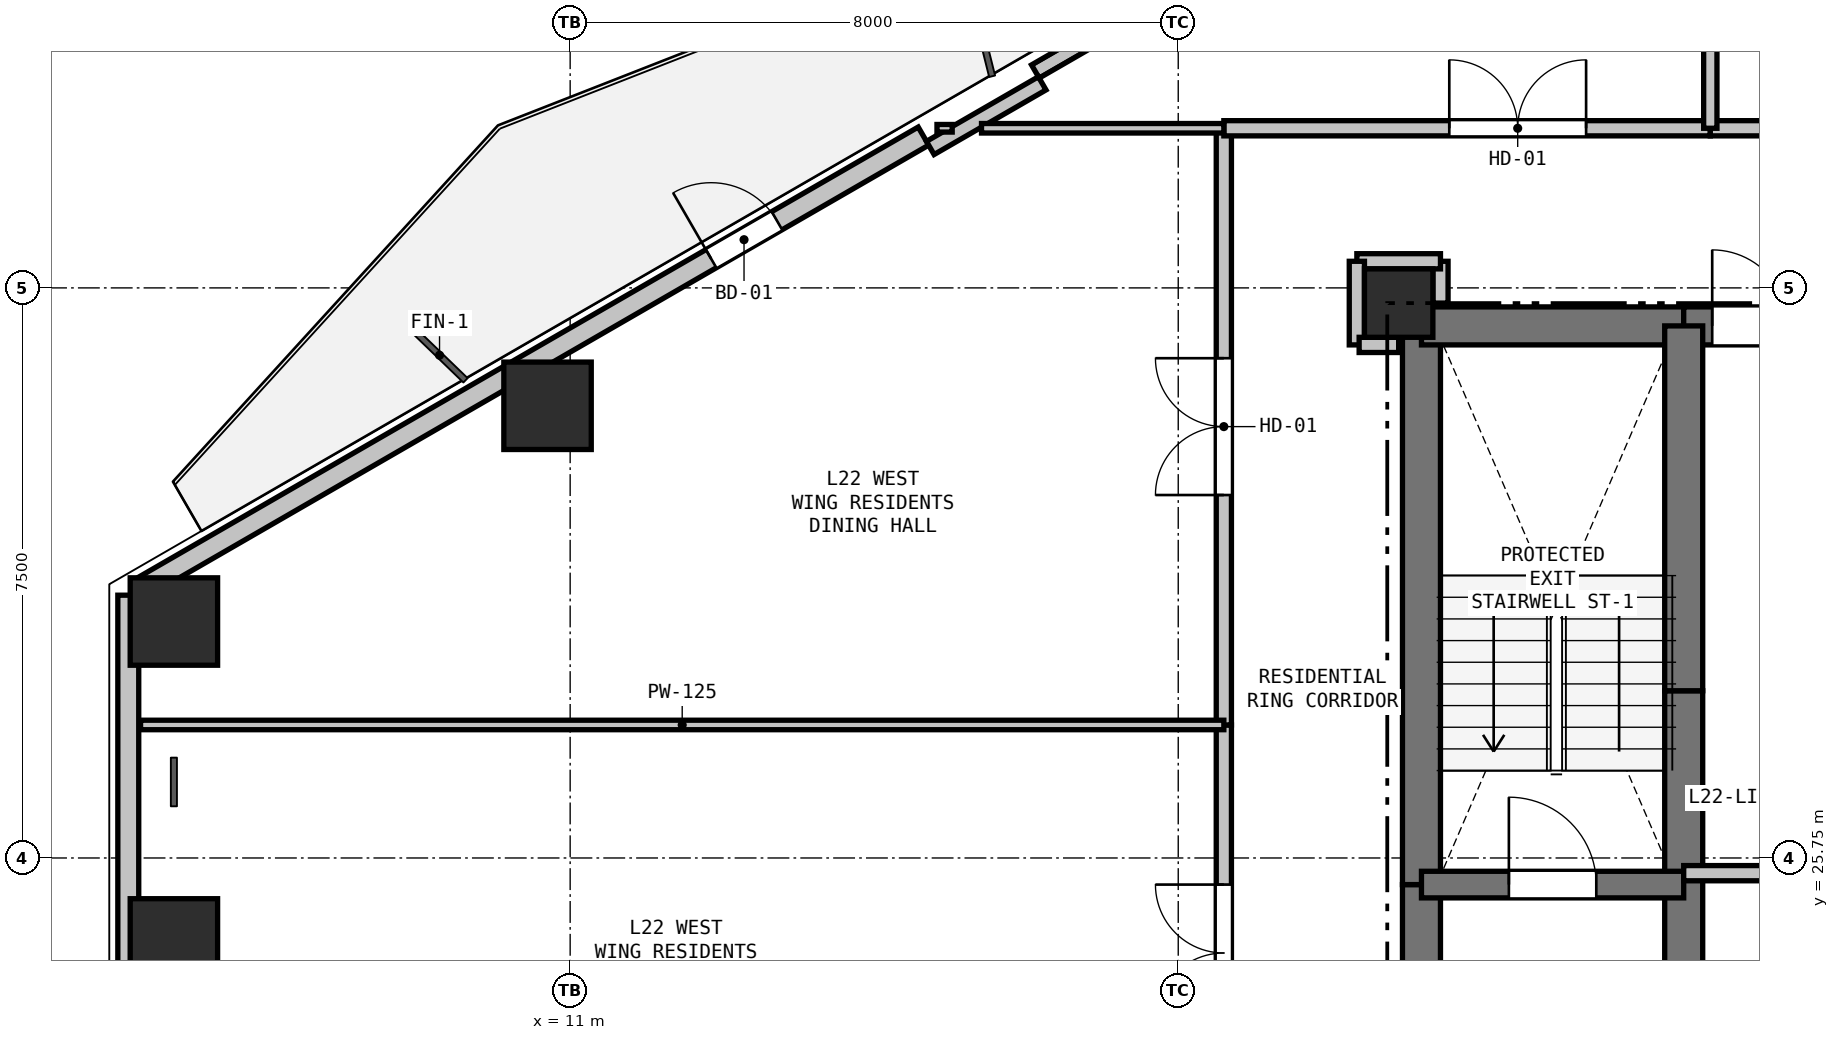
"""IFC4 building model, lengths in metres.
Left out: names, types, materials, properties, quantities, classifications, styles, units other than length and angle.
Written with IfcOpenShell. Run it as: python <this file> out.ifc"""

import sys

from ifc_helpers import new_model, si_unit, direction, frame, frame_2d, origin, origin_2d, place, context, subcontext, project, spatial, rectangle, hollow_rectangle, extrude, element, fill, save


model = new_model("IFC4")
c1 = context("Model", 3, precision=1e-05, world=origin(), true_north=direction((0.0, 1.0)))
c2 = subcontext(c1, "Body", "Model", "MODEL_VIEW")
j1 = project(units=[si_unit("LENGTHUNIT", "METRE"), si_unit("PLANEANGLEUNIT", "RADIAN")], contexts=[c1])
p1 = place(None, origin())
s1 = spatial("IfcSite", under=j1, at=p1, CompositionType="ELEMENT")
p2 = place(p1, origin())
s2 = spatial("IfcBuilding", under=s1, at=p2, CompositionType="ELEMENT")
p3 = place(p2, frame((0.0, 0.0, 83.4)))
s3 = spatial("IfcBuildingStorey", under=s2, at=p3, CompositionType="ELEMENT", Elevation=83.4)
p4 = place(p3, frame((21.9, 33.05, 0.0), z_axis=(0.0, 0.0, 1.0), x_axis=(1.0, 0.0, 0.0)))
e1 = element("IfcColumn", 1, at=p4, inside=s3, PredefinedType="COLUMN", context=c2, shape_type="SweptSolid", body=[
    extrude(rectangle(XDim=0.9, YDim=0.9, at=origin_2d()), origin(), (0.0, 0.0, 1.0), 3.3),
])
for number, where, z_axis, x_axis in (
    (2, (5.787, 28.861, 0.0), (0.0, 0.0, 1.0), (1.0, 0.0, 0.0)),
    (3, (10.702, 31.699, 0.0), (0.0, 0.0, 1.0), (1.0, 0.0, 0.0)),
    (4, (5.787, 24.639, 0.0), (0.0, 0.0, 1.0), (1.0, 0.0, 0.0)),
):
    element("IfcColumn", number, at=place(p3, frame(where, z_axis=z_axis, x_axis=x_axis)), inside=s3, PredefinedType="COLUMN", context=c2, shape_type="SweptSolid", body=[
        extrude(hollow_rectangle(XDim=1.15, YDim=1.15, WallThickness=0.032, at=origin_2d()), origin(), (0.0, 0.0, 1.0), 3.3),
    ])
p5 = place(p3, frame((5.187, 24.293, 0.0), z_axis=(0.0, 0.0, 1.0), x_axis=(0.0, 1.0, 0.0)))
e5 = element("IfcWall", 5, at=p5, inside=s3, PredefinedType="SOLIDWALL", context=c2, shape_type="SweptSolid", body=[
    extrude(rectangle(XDim=4.915, YDim=0.275, at=frame_2d((2.457, 0.0))), origin(), (0.0, 0.0, 1.0), 2.67),
])
p6 = place(p3, frame((5.317, 29.282, 0.0), z_axis=(0.0, 0.0, 1.0), x_axis=(0.866023023012, 0.500004123596, 0.0)))
e6 = element("IfcWall", 6, at=p6, inside=s3, PredefinedType="SOLIDWALL", context=c2, shape_type="SweptSolid", body=[
    extrude(rectangle(XDim=11.93, YDim=0.275, at=frame_2d((5.965, 0.0))), origin(), (0.0, 0.0, 1.0), 2.67),
])
p7 = place(p6, frame((8.704, 0.0, 0.0)))
e7 = element("IfcOpeningElement", 7, at=p7, cuts=e6, PredefinedType="OPENING", context=c2, shape_type="SweptSolid", body=[
    extrude(rectangle(XDim=1.0, YDim=2.1, at=frame_2d((0.5, 1.05))), frame((0.0, 0.147, 0.0), z_axis=(0.0, -1.0, 0.0), x_axis=(1.0, 0.0, 0.0)), (0.0, 0.0, 1.0), 0.295),
])
p8 = place(p3, frame((17.12, 36.097, 0.0), z_axis=(0.0, 0.0, 1.0), x_axis=(0.866027010039, 0.499997217876, 0.0)))
e8 = element("IfcWall", 8, at=p8, inside=s3, PredefinedType="PARAPET", context=c2, shape_type="SweptSolid", body=[
    extrude(rectangle(XDim=11.229, YDim=0.2, at=frame_2d((5.615, 0.0))), origin(), (0.0, 0.0, 1.0), 0.2),
])
p9 = place(p3, frame((15.738, 35.091, 0.0), z_axis=(0.0, 0.0, 1.0), x_axis=(0.866025371046, 0.500000056704, 0.0)))
e9 = element("IfcWall", 9, at=p9, inside=s3, PredefinedType="PARAPET", context=c2, shape_type="SweptSolid", body=[
    extrude(rectangle(XDim=1.7, YDim=0.2, at=frame_2d((0.85, 0.0))), origin(), (0.0, 0.0, 1.0), 2.67),
])
p10 = place(p3, frame((22.2, 20.75, 0.0), z_axis=(0.0, 0.0, 1.0), x_axis=(0.0, 1.0, 0.0)))
e10 = element("IfcWall", 10, at=p10, inside=s3, PredefinedType="SHEAR", context=c2, shape_type="SweptSolid", body=[
    extrude(rectangle(XDim=4.65, YDim=0.5, at=frame_2d((2.325, 0.0))), origin(), (0.0, 0.0, 1.0), 3.05),
])
p11 = place(p3, frame((22.2, 25.4, 0.0), z_axis=(0.0, 0.0, 1.0), x_axis=(0.0, 1.0, 0.0)))
e11 = element("IfcWall", 11, at=p11, inside=s3, PredefinedType="SHEAR", context=c2, shape_type="SweptSolid", body=[
    extrude(rectangle(XDim=7.35, YDim=0.5, at=frame_2d((3.675, 0.0))), origin(), (0.0, 0.0, 1.0), 3.05),
])
p12 = place(p3, frame((22.2, 32.75, 0.0), z_axis=(0.0, 0.0, 1.0), x_axis=(1.0, 0.0, 0.0)))
e12 = element("IfcWall", 12, at=p12, inside=s3, PredefinedType="SHEAR", context=c2, shape_type="SweptSolid", body=[
    extrude(rectangle(XDim=3.45, YDim=0.5, at=frame_2d((1.725, 0.0))), origin(), (0.0, 0.0, 1.0), 3.05),
])
p13 = place(p3, frame((25.65, 32.75, 0.0), z_axis=(0.0, 0.0, 1.0), x_axis=(1.0, 0.0, 0.0)))
e13 = element("IfcWall", 13, at=p13, inside=s3, PredefinedType="SHEAR", context=c2, shape_type="SweptSolid", body=[
    extrude(rectangle(XDim=1.75, YDim=0.5, at=frame_2d((0.875, 0.0))), origin(), (0.0, 0.0, 1.0), 3.05),
])
p14 = place(p13, frame((0.375, 0.0, 0.0)))
e14 = element("IfcOpeningElement", 14, at=p14, cuts=e13, PredefinedType="OPENING", context=c2, shape_type="SweptSolid", body=[
    extrude(rectangle(XDim=1.0, YDim=2.15, at=frame_2d((0.5, 1.075))), frame((0.0, 0.26, 0.0), z_axis=(0.0, -1.0, 0.0), x_axis=(1.0, 0.0, 0.0)), (0.0, 0.0, 1.0), 0.52),
])
p15 = place(p3, frame((25.65, 22.75, 0.0), z_axis=(0.0, 0.0, 1.0), x_axis=(0.0, 1.0, 0.0)))
e15 = element("IfcWall", 15, at=p15, inside=s3, PredefinedType="SHEAR", context=c2, shape_type="SweptSolid", body=[
    extrude(rectangle(XDim=2.8, YDim=0.5, at=frame_2d((1.4, 0.0))), origin(), (0.0, 0.0, 1.0), 3.05),
])
p16 = place(p3, frame((25.65, 25.55, 0.0), z_axis=(0.0, 0.0, 1.0), x_axis=(0.0, 1.0, 0.0)))
e16 = element("IfcWall", 16, at=p16, inside=s3, PredefinedType="SHEAR", context=c2, shape_type="SweptSolid", body=[
    extrude(rectangle(XDim=2.4, YDim=0.5, at=frame_2d((1.2, 0.0))), origin(), (0.0, 0.0, 1.0), 3.05),
])
p17 = place(p3, frame((25.65, 27.95, 0.0), z_axis=(0.0, 0.0, 1.0), x_axis=(0.0, 1.0, 0.0)))
e17 = element("IfcWall", 17, at=p17, inside=s3, PredefinedType="SHEAR", context=c2, shape_type="SweptSolid", body=[
    extrude(rectangle(XDim=4.8, YDim=0.5, at=frame_2d((2.4, 0.0))), origin(), (0.0, 0.0, 1.0), 3.05),
])
p18 = place(p3, frame((22.2, 25.4, 0.0), z_axis=(0.0, 0.0, 1.0), x_axis=(1.0, 0.0, 0.0)))
e18 = element("IfcWall", 18, at=p18, inside=s3, PredefinedType="SHEAR", context=c2, shape_type="SweptSolid", body=[
    extrude(rectangle(XDim=3.45, YDim=0.35, at=frame_2d((1.725, 0.0))), origin(), (0.0, 0.0, 1.0), 3.05),
])
p19 = place(p18, frame((1.15, 0.0, 0.0)))
e19 = element("IfcOpeningElement", 19, at=p19, cuts=e18, PredefinedType="OPENING", context=c2, shape_type="SweptSolid", body=[
    extrude(rectangle(XDim=1.15, YDim=2.15, at=frame_2d((0.575, 1.075))), frame((0.0, 0.185, 0.0), z_axis=(0.0, -1.0, 0.0), x_axis=(1.0, 0.0, 0.0)), (0.0, 0.0, 1.0), 0.37),
])
p20 = place(p3, frame((25.65, 25.55, 0.0), z_axis=(0.0, 0.0, 1.0), x_axis=(1.0, 0.0, 0.0)))
e20 = element("IfcWall", 20, at=p20, inside=s3, PredefinedType="PARTITIONING", context=c2, shape_type="SweptSolid", body=[
    extrude(rectangle(XDim=4.95, YDim=0.2, at=frame_2d((2.475, 0.0))), origin(), (0.0, 0.0, 1.0), 3.05),
])
p21 = place(p3, frame((19.6, 21.5, 0.0), z_axis=(0.0, 0.0, 1.0), x_axis=(0.0, 1.0, 0.0)))
e21 = element("IfcWall", 21, at=p21, inside=s3, PredefinedType="PARTITIONING", context=c2, shape_type="SweptSolid", body=[
    extrude(rectangle(XDim=6.0, YDim=0.2, at=frame_2d((3.0, 0.0))), origin(), (0.0, 0.0, 1.0), 3.05),
])
p22 = place(p21, frame((2.1, 0.0, 0.0)))
e22 = element("IfcOpeningElement", 22, at=p22, cuts=e21, PredefinedType="OPENING", context=c2, shape_type="SweptSolid", body=[
    extrude(rectangle(XDim=1.8, YDim=2.2, at=frame_2d((0.9, 1.1))), frame((0.0, 0.11, 0.0), z_axis=(0.0, -1.0, 0.0), x_axis=(1.0, 0.0, 0.0)), (0.0, 0.0, 1.0), 0.22),
])
p23 = place(p3, frame((19.6, 27.5, 0.0), z_axis=(0.0, 0.0, 1.0), x_axis=(0.0, 1.0, 0.0)))
e23 = element("IfcWall", 23, at=p23, inside=s3, PredefinedType="PARTITIONING", context=c2, shape_type="SweptSolid", body=[
    extrude(rectangle(XDim=7.85, YDim=0.2, at=frame_2d((3.925, 0.0))), origin(), (0.0, 0.0, 1.0), 2.423),
])
p24 = place(p23, frame((3.025, 0.0, 0.0)))
e24 = element("IfcOpeningElement", 24, at=p24, cuts=e23, PredefinedType="OPENING", context=c2, shape_type="SweptSolid", body=[
    extrude(rectangle(XDim=1.8, YDim=2.2, at=frame_2d((0.9, 1.1))), frame((0.0, 0.11, 0.0), z_axis=(0.0, -1.0, 0.0), x_axis=(1.0, 0.0, 0.0)), (0.0, 0.0, 1.0), 0.22),
])
p25 = place(p3, frame((19.6, 35.35, 0.0), z_axis=(0.0, 0.0, 1.0), x_axis=(1.0, 0.0, 0.0)))
e25 = element("IfcWall", 25, at=p25, inside=s3, PredefinedType="PARTITIONING", context=c2, shape_type="SweptSolid", body=[
    extrude(rectangle(XDim=6.4, YDim=0.2, at=frame_2d((3.2, 0.0))), origin(), (0.0, 0.0, 1.0), 3.05),
])
p26 = place(p25, frame((2.966, 0.0, 0.0)))
e26 = element("IfcOpeningElement", 26, at=p26, cuts=e25, PredefinedType="OPENING", context=c2, shape_type="SweptSolid", body=[
    extrude(rectangle(XDim=1.8, YDim=2.2, at=frame_2d((0.9, 1.1))), frame((0.0, 0.11, 0.0), z_axis=(0.0, -1.0, 0.0), x_axis=(1.0, 0.0, 0.0)), (0.0, 0.0, 1.0), 0.22),
])
p27 = place(p3, frame((26.0, 35.35, 0.0), z_axis=(0.0, 0.0, 1.0), x_axis=(1.0, 0.0, 0.0)))
e27 = element("IfcWall", 27, at=p27, inside=s3, PredefinedType="PARTITIONING", context=c2, shape_type="SweptSolid", body=[
    extrude(rectangle(XDim=2.2, YDim=0.2, at=frame_2d((1.1, 0.0))), origin(), (0.0, 0.0, 1.0), 3.05),
])
p28 = place(p27, frame((0.675, 0.0, 0.0)))
e28 = element("IfcOpeningElement", 28, at=p28, cuts=e27, PredefinedType="OPENING", context=c2, shape_type="SweptSolid", body=[
    extrude(rectangle(XDim=0.85, YDim=2.1, at=frame_2d((0.425, 1.05))), frame((0.0, 0.11, 0.0), z_axis=(0.0, -1.0, 0.0), x_axis=(1.0, 0.0, 0.0)), (0.0, 0.0, 1.0), 0.22),
])
p29 = place(p3, frame((22.45, 33.05, 0.0), z_axis=(0.0, 0.0, 1.0), x_axis=(0.0, 1.0, 0.0)))
e29 = element("IfcWall", 29, at=p29, inside=s3, PredefinedType="PARTITIONING", context=c2, shape_type="SweptSolid", body=[
    extrude(rectangle(XDim=0.55, YDim=0.2, at=frame_2d((0.275, 0.0))), origin(), (0.0, 0.0, 1.0), 2.498),
])
p30 = place(p3, frame((22.45, 33.6, 0.0), z_axis=(0.0, 0.0, 1.0), x_axis=(-1.0, 0.0, 0.0)))
e30 = element("IfcWall", 30, at=p30, inside=s3, PredefinedType="PARTITIONING", context=c2, shape_type="SweptSolid", body=[
    extrude(rectangle(XDim=1.1, YDim=0.2, at=frame_2d((0.55, 0.0))), origin(), (0.0, 0.0, 1.0), 3.05),
])
p31 = place(p3, frame((21.35, 33.6, 0.0), z_axis=(0.0, 0.0, 1.0), x_axis=(0.0, -1.0, 0.0)))
e31 = element("IfcWall", 31, at=p31, inside=s3, PredefinedType="PARTITIONING", context=c2, shape_type="SweptSolid", body=[
    extrude(rectangle(XDim=1.1, YDim=0.2, at=frame_2d((0.55, 0.0))), origin(), (0.0, 0.0, 1.0), 2.423),
])
p32 = place(p3, frame((21.38, 32.5, 0.0), z_axis=(0.0, 0.0, 1.0), x_axis=(1.0, 0.0, 0.0)))
e32 = element("IfcWall", 32, at=p32, inside=s3, PredefinedType="PARTITIONING", context=c2, shape_type="SweptSolid", body=[
    extrude(rectangle(XDim=0.52, YDim=0.2, at=frame_2d((0.26, 0.0))), origin(), (0.0, 0.0, 1.0), 2.498),
])
p33 = place(p3, frame((26.0, 35.35, 0.0), z_axis=(0.0, 0.0, 1.0), x_axis=(0.0, 1.0, 0.0)))
e33 = element("IfcWall", 33, at=p33, inside=s3, PredefinedType="PLUMBINGWALL", context=c2, shape_type="SweptSolid", body=[
    extrude(rectangle(XDim=2.3, YDim=0.175, at=frame_2d((1.15, 0.0))), origin(), (0.0, 0.0, 1.0), 3.05),
])
p34 = place(p3, frame((19.6, 35.35, 0.0), z_axis=(0.0, 0.0, 1.0), x_axis=(-1.0, 0.0, 0.0)))
e34 = element("IfcWall", 34, at=p34, inside=s3, PredefinedType="PARTITIONING", context=c2, shape_type="SweptSolid", body=[
    extrude(rectangle(XDim=3.188, YDim=0.125, at=frame_2d((1.594, 0.0))), origin(), (0.0, 0.0, 1.0), 2.365),
])
p35 = place(p3, frame((16.026, 35.35, 0.0), z_axis=(0.0, 0.0, 1.0), x_axis=(-1.0, 0.0, 0.0)))
e35 = element("IfcWall", 35, at=p35, inside=s3, PredefinedType="PARTITIONING", context=c2, shape_type="SweptSolid", body=[
    extrude(rectangle(XDim=0.2, YDim=0.1, at=frame_2d((0.1, 0.0))), origin(), (0.0, 0.0, 1.0), 3.05),
])
p36 = place(p3, frame((19.6, 27.5, 0.0), z_axis=(0.0, 0.0, 1.0), x_axis=(-1.0, 0.0, 0.0)))
e36 = element("IfcWall", 36, at=p36, inside=s3, PredefinedType="PARTITIONING", context=c2, shape_type="SweptSolid", body=[
    extrude(rectangle(XDim=14.252, YDim=0.125, at=frame_2d((7.126, 0.0))), origin(), (0.0, 0.0, 1.0), 2.66),
])
p37 = place(p7, origin())
e37 = element("IfcDoor", 37, at=p37, inside=s3, OperationType="SINGLE_SWING_LEFT", PredefinedType="DOOR", context=c2, shape_type="SweptSolid", body=[
    extrude(rectangle(XDim=1.0, YDim=2.1, at=frame_2d((0.5, 1.05))), frame((0.0, 0.025, 0.0), z_axis=(0.0, -1.0, 0.0), x_axis=(1.0, 0.0, 0.0)), (0.0, 0.0, 1.0), 0.05),
])
fill(e7, e37)
p38 = place(p14, origin())
e38 = element("IfcDoor", 38, at=p38, inside=s3, OperationType="SINGLE_SWING_LEFT", PredefinedType="DOOR", context=c2, shape_type="SweptSolid", body=[
    extrude(rectangle(XDim=1.0, YDim=2.15, at=frame_2d((0.5, 1.075))), frame((0.0, 0.025, 0.0), z_axis=(0.0, -1.0, 0.0), x_axis=(1.0, 0.0, 0.0)), (0.0, 0.0, 1.0), 0.05),
])
fill(e14, e38)
p39 = place(p19, origin())
e39 = element("IfcDoor", 39, at=p39, inside=s3, OperationType="SINGLE_SWING_LEFT", PredefinedType="DOOR", context=c2, shape_type="SweptSolid", body=[
    extrude(rectangle(XDim=1.15, YDim=2.15, at=frame_2d((0.575, 1.075))), frame((0.0, 0.025, 0.0), z_axis=(0.0, -1.0, 0.0), x_axis=(1.0, 0.0, 0.0)), (0.0, 0.0, 1.0), 0.05),
])
fill(e19, e39)
p40 = place(p26, origin())
e40 = element("IfcDoor", 40, at=p40, inside=s3, OperationType="DOUBLE_DOOR_SINGLE_SWING", PredefinedType="DOOR", context=c2, shape_type="SweptSolid", body=[
    extrude(rectangle(XDim=1.8, YDim=2.2, at=frame_2d((0.9, 1.1))), frame((0.0, 0.025, 0.0), z_axis=(0.0, -1.0, 0.0), x_axis=(1.0, 0.0, 0.0)), (0.0, 0.0, 1.0), 0.05),
])
fill(e26, e40)
p41 = place(p24, origin())
e41 = element("IfcDoor", 41, at=p41, inside=s3, OperationType="DOUBLE_DOOR_SINGLE_SWING", PredefinedType="DOOR", context=c2, shape_type="SweptSolid", body=[
    extrude(rectangle(XDim=1.8, YDim=2.2, at=frame_2d((0.9, 1.1))), frame((0.0, 0.025, 0.0), z_axis=(0.0, -1.0, 0.0), x_axis=(1.0, 0.0, 0.0)), (0.0, 0.0, 1.0), 0.05),
])
fill(e24, e41)
p42 = place(p22, origin())
e42 = element("IfcDoor", 42, at=p42, inside=s3, OperationType="DOUBLE_DOOR_SINGLE_SWING", PredefinedType="DOOR", context=c2, shape_type="SweptSolid", body=[
    extrude(rectangle(XDim=1.8, YDim=2.2, at=frame_2d((0.9, 1.1))), frame((0.0, 0.025, 0.0), z_axis=(0.0, -1.0, 0.0), x_axis=(1.0, 0.0, 0.0)), (0.0, 0.0, 1.0), 0.05),
])
fill(e22, e42)
save(model, sys.argv[1])
